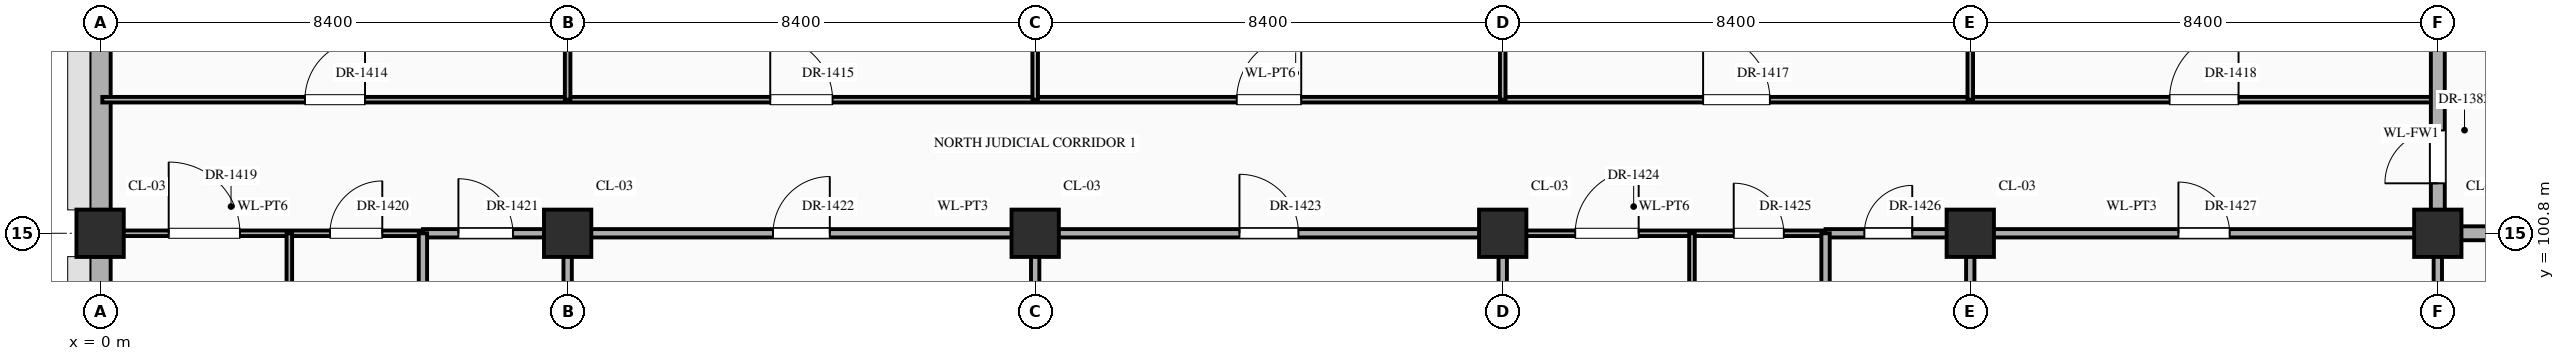
"""IFC4 building model, lengths in metres.
Left out: names, types, materials, properties, quantities, classifications, styles, units other than length and angle.
Written with IfcOpenShell. Run it as: python <this file> out.ifc"""

import sys

from ifc_helpers import new_model, si_unit, direction, frame, frame_2d, origin, origin_2d, place, context, subcontext, project, spatial, rectangle, extrude, element, fill, save


model = new_model("IFC4")
c1 = context("Model", 3, precision=1e-05, world=origin(), true_north=direction((0.0, 1.0)))
c2 = subcontext(c1, "Body", "Model", "MODEL_VIEW")
j1 = project(units=[si_unit("LENGTHUNIT", "METRE"), si_unit("PLANEANGLEUNIT", "RADIAN")], contexts=[c1])
p1 = place(None, origin())
s1 = spatial("IfcSite", under=j1, at=p1, CompositionType="ELEMENT")
p2 = place(p1, origin())
s2 = spatial("IfcBuilding", under=s1, at=p2, CompositionType="ELEMENT")
p3 = place(p2, frame((0.0, 0.0, 10.8)))
s3 = spatial("IfcBuildingStorey", under=s2, at=p3, CompositionType="ELEMENT", Elevation=10.8)
for number, where, z_axis, x_axis in (
    (1, (0.0, 100.8, 0.0), (0.0, 0.0, 1.0), (1.0, 0.0, 0.0)),
    (2, (8.4, 100.8, 0.0), (0.0, 0.0, 1.0), (1.0, 0.0, 0.0)),
    (3, (16.8, 100.8, 0.0), (0.0, 0.0, 1.0), (1.0, 0.0, 0.0)),
    (4, (25.2, 100.8, 0.0), (0.0, 0.0, 1.0), (1.0, 0.0, 0.0)),
    (5, (33.6, 100.8, 0.0), (0.0, 0.0, 1.0), (1.0, 0.0, 0.0)),
    (6, (42.0, 100.8, 0.0), (0.0, 0.0, 1.0), (1.0, 0.0, 0.0)),
):
    element("IfcColumn", number, at=place(p3, frame(where, z_axis=z_axis, x_axis=x_axis)), inside=s3, PredefinedType="COLUMN", context=c2, shape_type="SweptSolid", body=[
        extrude(rectangle(XDim=0.85, YDim=0.85, at=origin_2d()), origin(), (0.0, 0.0, 1.0), 5.4),
    ])
p4 = place(p3, frame((0.0, 94.02, 0.0), z_axis=(0.0, 0.0, 1.0), x_axis=(0.0, 1.0, 0.0)))
e7 = element("IfcWall", 7, at=p4, inside=s3, PredefinedType="STANDARD", context=c2, shape_type="SweptSolid", body=[
    extrude(rectangle(XDim=6.36, YDim=0.38, at=frame_2d((3.18, 0.0))), origin(), (0.0, 0.0, 1.0), 4.47),
])
p5 = place(p4, frame((4.03, 0.0, 0.85)))
e8 = element("IfcOpeningElement", 8, at=p5, cuts=e7, PredefinedType="OPENING", context=c2, shape_type="SweptSolid", body=[
    extrude(rectangle(XDim=0.9, YDim=1.56, at=frame_2d((0.45, 0.78))), frame((0.0, 0.202, 0.0), z_axis=(0.0, -1.0, 0.0), x_axis=(1.0, 0.0, 0.0)), (0.0, 0.0, 1.0), 0.404),
])
p6 = place(p3, frame((0.0, 101.22, 0.0), z_axis=(0.0, 0.0, 1.0), x_axis=(0.0, 1.0, 0.0)))
e9 = element("IfcWall", 9, at=p6, inside=s3, PredefinedType="STANDARD", context=c2, shape_type="SweptSolid", body=[
    extrude(rectangle(XDim=6.36, YDim=0.38, at=frame_2d((3.18, 0.0))), origin(), (0.0, 0.0, 1.0), 4.47),
])
p7 = place(p6, frame((4.03, 0.0, 0.85)))
e10 = element("IfcOpeningElement", 10, at=p7, cuts=e9, PredefinedType="OPENING", context=c2, shape_type="SweptSolid", body=[
    extrude(rectangle(XDim=0.9, YDim=1.74, at=frame_2d((0.45, 0.87))), frame((0.0, 0.202, 0.0), z_axis=(0.0, -1.0, 0.0), x_axis=(1.0, 0.0, 0.0)), (0.0, 0.0, 1.0), 0.404),
])
p8 = place(p3, frame((0.04, 100.8, 0.0), z_axis=(0.0, 0.0, 1.0), x_axis=(1.0, 0.0, 0.0)))
e11 = element("IfcWall", 11, at=p8, inside=s3, PredefinedType="STANDARD", context=c2, shape_type="SweptSolid", body=[
    extrude(rectangle(XDim=5.76, YDim=0.1, at=frame_2d((2.88, 0.0))), origin(), (0.0, 0.0, 1.0), 4.27),
])
p9 = place(p8, frame((1.192, 0.0, 0.0)))
e12 = element("IfcOpeningElement", 12, at=p9, cuts=e11, PredefinedType="OPENING", context=c2, shape_type="SweptSolid", body=[
    extrude(rectangle(XDim=1.28, YDim=2.35, at=frame_2d((0.64, 1.175))), frame((0.0, 0.062, 0.0), z_axis=(0.0, -1.0, 0.0), x_axis=(1.0, 0.0, 0.0)), (0.0, 0.0, 1.0), 0.124),
])
p10 = place(p8, frame((4.09, 0.0, 0.0)))
e13 = element("IfcOpeningElement", 13, at=p10, cuts=e11, PredefinedType="OPENING", context=c2, shape_type="SweptSolid", body=[
    extrude(rectangle(XDim=0.94, YDim=2.3, at=frame_2d((0.47, 1.15))), frame((0.0, 0.062, 0.0), z_axis=(0.0, -1.0, 0.0), x_axis=(1.0, 0.0, 0.0)), (0.0, 0.0, 1.0), 0.124),
])
p11 = place(p3, frame((5.8, 100.8, 0.0), z_axis=(0.0, 0.0, 1.0), x_axis=(1.0, 0.0, 0.0)))
e14 = element("IfcWall", 14, at=p11, inside=s3, PredefinedType="STANDARD", context=c2, shape_type="SweptSolid", body=[
    extrude(rectangle(XDim=19.4, YDim=0.15, at=frame_2d((9.7, 0.0))), origin(), (0.0, 0.0, 1.0), 4.27),
])
p12 = place(p11, frame((0.637, 0.0, 0.0)))
e15 = element("IfcOpeningElement", 15, at=p12, cuts=e14, PredefinedType="OPENING", context=c2, shape_type="SweptSolid", body=[
    extrude(rectangle(XDim=0.98, YDim=2.35, at=frame_2d((0.49, 1.175))), frame((0.0, 0.087, 0.0), z_axis=(0.0, -1.0, 0.0), x_axis=(1.0, 0.0, 0.0)), (0.0, 0.0, 1.0), 0.174),
])
p13 = place(p11, frame((6.29, 0.0, 0.0)))
e16 = element("IfcOpeningElement", 16, at=p13, cuts=e14, PredefinedType="OPENING", context=c2, shape_type="SweptSolid", body=[
    extrude(rectangle(XDim=1.02, YDim=2.4, at=frame_2d((0.51, 1.2))), frame((0.0, 0.087, 0.0), z_axis=(0.0, -1.0, 0.0), x_axis=(1.0, 0.0, 0.0)), (0.0, 0.0, 1.0), 0.174),
])
p14 = place(p11, frame((14.67, 0.0, 0.0)))
e17 = element("IfcOpeningElement", 17, at=p14, cuts=e14, PredefinedType="OPENING", context=c2, shape_type="SweptSolid", body=[
    extrude(rectangle(XDim=1.06, YDim=2.4, at=frame_2d((0.53, 1.2))), frame((0.0, 0.087, 0.0), z_axis=(0.0, -1.0, 0.0), x_axis=(1.0, 0.0, 0.0)), (0.0, 0.0, 1.0), 0.174),
])
p15 = place(p3, frame((25.2, 100.8, 0.0), z_axis=(0.0, 0.0, 1.0), x_axis=(1.0, 0.0, 0.0)))
e18 = element("IfcWall", 18, at=p15, inside=s3, PredefinedType="STANDARD", context=c2, shape_type="SweptSolid", body=[
    extrude(rectangle(XDim=5.8, YDim=0.1, at=frame_2d((2.9, 0.0))), origin(), (0.0, 0.0, 1.0), 4.27),
])
p16 = place(p15, frame((1.302, 0.0, 0.0)))
e19 = element("IfcOpeningElement", 19, at=p16, cuts=e18, PredefinedType="OPENING", context=c2, shape_type="SweptSolid", body=[
    extrude(rectangle(XDim=1.14, YDim=2.4, at=frame_2d((0.57, 1.2))), frame((0.0, 0.062, 0.0), z_axis=(0.0, -1.0, 0.0), x_axis=(1.0, 0.0, 0.0)), (0.0, 0.0, 1.0), 0.124),
])
p17 = place(p15, frame((4.15, 0.0, 0.0)))
e20 = element("IfcOpeningElement", 20, at=p17, cuts=e18, PredefinedType="OPENING", context=c2, shape_type="SweptSolid", body=[
    extrude(rectangle(XDim=0.9, YDim=2.15, at=frame_2d((0.45, 1.075))), frame((0.0, 0.062, 0.0), z_axis=(0.0, -1.0, 0.0), x_axis=(1.0, 0.0, 0.0)), (0.0, 0.0, 1.0), 0.124),
])
p18 = place(p3, frame((31.0, 100.8, 0.0), z_axis=(0.0, 0.0, 1.0), x_axis=(1.0, 0.0, 0.0)))
e21 = element("IfcWall", 21, at=p18, inside=s3, PredefinedType="STANDARD", context=c2, shape_type="SweptSolid", body=[
    extrude(rectangle(XDim=11.0, YDim=0.15, at=frame_2d((5.5, 0.0))), origin(), (0.0, 0.0, 1.0), 4.27),
])
p19 = place(p18, frame((0.698, 0.0, 0.0)))
e22 = element("IfcOpeningElement", 22, at=p19, cuts=e21, PredefinedType="OPENING", context=c2, shape_type="SweptSolid", body=[
    extrude(rectangle(XDim=0.86, YDim=2.1, at=frame_2d((0.43, 1.05))), frame((0.0, 0.087, 0.0), z_axis=(0.0, -1.0, 0.0), x_axis=(1.0, 0.0, 0.0)), (0.0, 0.0, 1.0), 0.174),
])
p20 = place(p18, frame((6.34, 0.0, 0.0)))
e23 = element("IfcOpeningElement", 23, at=p20, cuts=e21, PredefinedType="OPENING", context=c2, shape_type="SweptSolid", body=[
    extrude(rectangle(XDim=0.92, YDim=2.15, at=frame_2d((0.46, 1.075))), frame((0.0, 0.087, 0.0), z_axis=(0.0, -1.0, 0.0), x_axis=(1.0, 0.0, 0.0)), (0.0, 0.0, 1.0), 0.174),
])
p21 = place(p3, frame((42.0, 100.8, 0.0), z_axis=(0.0, 0.0, 1.0), x_axis=(1.0, 0.0, 0.0)))
e24 = element("IfcWall", 24, at=p21, inside=s3, PredefinedType="STANDARD", context=c2, shape_type="SweptSolid", body=[
    extrude(rectangle(XDim=4.2, YDim=0.25, at=frame_2d((2.1, 0.0))), origin(), (0.0, 0.0, 1.0), 4.27),
])
p22 = place(p3, frame((0.04, 103.2, 0.0), z_axis=(0.0, 0.0, 1.0), x_axis=(1.0, 0.0, 0.0)))
e25 = element("IfcWall", 25, at=p22, inside=s3, PredefinedType="STANDARD", context=c2, shape_type="SweptSolid", body=[
    extrude(rectangle(XDim=41.96, YDim=0.1, at=frame_2d((20.98, 0.0))), origin(), (0.0, 0.0, 1.0), 5.12),
])
p23 = place(p22, frame((3.64, 0.0, 0.0)))
e26 = element("IfcOpeningElement", 26, at=p23, cuts=e25, PredefinedType="OPENING", context=c2, shape_type="SweptSolid", body=[
    extrude(rectangle(XDim=1.08, YDim=2.25, at=frame_2d((0.54, 1.125))), frame((0.0, 0.062, 0.0), z_axis=(0.0, -1.0, 0.0), x_axis=(1.0, 0.0, 0.0)), (0.0, 0.0, 1.0), 0.124),
])
p24 = place(p22, frame((12.0, 0.0, 0.0)))
e27 = element("IfcOpeningElement", 27, at=p24, cuts=e25, PredefinedType="OPENING", context=c2, shape_type="SweptSolid", body=[
    extrude(rectangle(XDim=1.12, YDim=2.25, at=frame_2d((0.56, 1.125))), frame((0.0, 0.062, 0.0), z_axis=(0.0, -1.0, 0.0), x_axis=(1.0, 0.0, 0.0)), (0.0, 0.0, 1.0), 0.124),
])
p25 = place(p22, frame((20.38, 0.0, 0.0)))
e28 = element("IfcOpeningElement", 28, at=p25, cuts=e25, PredefinedType="OPENING", context=c2, shape_type="SweptSolid", body=[
    extrude(rectangle(XDim=1.16, YDim=2.3, at=frame_2d((0.58, 1.15))), frame((0.0, 0.062, 0.0), z_axis=(0.0, -1.0, 0.0), x_axis=(1.0, 0.0, 0.0)), (0.0, 0.0, 1.0), 0.124),
])
p26 = place(p22, frame((28.76, 0.0, 0.0)))
e29 = element("IfcOpeningElement", 29, at=p26, cuts=e25, PredefinedType="OPENING", context=c2, shape_type="SweptSolid", body=[
    extrude(rectangle(XDim=1.2, YDim=2.35, at=frame_2d((0.6, 1.175))), frame((0.0, 0.062, 0.0), z_axis=(0.0, -1.0, 0.0), x_axis=(1.0, 0.0, 0.0)), (0.0, 0.0, 1.0), 0.124),
])
p27 = place(p22, frame((37.14, 0.0, 0.0)))
e30 = element("IfcOpeningElement", 30, at=p27, cuts=e25, PredefinedType="OPENING", context=c2, shape_type="SweptSolid", body=[
    extrude(rectangle(XDim=1.24, YDim=2.3, at=frame_2d((0.62, 1.15))), frame((0.0, 0.062, 0.0), z_axis=(0.0, -1.0, 0.0), x_axis=(1.0, 0.0, 0.0)), (0.0, 0.0, 1.0), 0.124),
])
p28 = place(p3, frame((3.4, 96.0, 0.0), z_axis=(0.0, 0.0, 1.0), x_axis=(0.0, 1.0, 0.0)))
e31 = element("IfcWall", 31, at=p28, inside=s3, PredefinedType="STANDARD", context=c2, shape_type="SweptSolid", body=[
    extrude(rectangle(XDim=4.8, YDim=0.1, at=frame_2d((2.4, 0.0))), origin(), (0.0, 0.0, 1.0), 5.12),
])
p29 = place(p28, frame((1.83, 0.0, 0.0)))
e32 = element("IfcOpeningElement", 32, at=p29, cuts=e31, PredefinedType="OPENING", context=c2, shape_type="SweptSolid", body=[
    extrude(rectangle(XDim=1.14, YDim=2.4, at=frame_2d((0.57, 1.2))), frame((0.0, 0.062, 0.0), z_axis=(0.0, -1.0, 0.0), x_axis=(1.0, 0.0, 0.0)), (0.0, 0.0, 1.0), 0.124),
])
p30 = place(p3, frame((5.8, 96.0, 0.0), z_axis=(0.0, 0.0, 1.0), x_axis=(0.0, 1.0, 0.0)))
e33 = element("IfcWall", 33, at=p30, inside=s3, PredefinedType="STANDARD", context=c2, shape_type="SweptSolid", body=[
    extrude(rectangle(XDim=4.8, YDim=0.15, at=frame_2d((2.4, 0.0))), origin(), (0.0, 0.0, 1.0), 5.12),
])
p31 = place(p30, frame((1.95, 0.0, 0.0)))
e34 = element("IfcOpeningElement", 34, at=p31, cuts=e33, PredefinedType="OPENING", context=c2, shape_type="SweptSolid", body=[
    extrude(rectangle(XDim=0.9, YDim=2.15, at=frame_2d((0.45, 1.075))), frame((0.0, 0.087, 0.0), z_axis=(0.0, -1.0, 0.0), x_axis=(1.0, 0.0, 0.0)), (0.0, 0.0, 1.0), 0.174),
])
p32 = place(p3, frame((8.4, 96.0, 0.0), z_axis=(0.0, 0.0, 1.0), x_axis=(0.0, 1.0, 0.0)))
e35 = element("IfcWall", 35, at=p32, inside=s3, PredefinedType="STANDARD", context=c2, shape_type="SweptSolid", body=[
    extrude(rectangle(XDim=4.8, YDim=0.15, at=frame_2d((2.4, 0.0))), origin(), (0.0, 0.0, 1.0), 4.37),
])
p33 = place(p3, frame((8.4, 103.2, 0.0), z_axis=(0.0, 0.0, 1.0), x_axis=(0.0, 1.0, 0.0)))
e36 = element("IfcWall", 36, at=p33, inside=s3, PredefinedType="STANDARD", context=c2, shape_type="SweptSolid", body=[
    extrude(rectangle(XDim=4.76, YDim=0.1, at=frame_2d((2.38, 0.0))), origin(), (0.0, 0.0, 1.0), 4.37),
])
p34 = place(p3, frame((16.8, 96.0, 0.0), z_axis=(0.0, 0.0, 1.0), x_axis=(0.0, 1.0, 0.0)))
e37 = element("IfcWall", 37, at=p34, inside=s3, PredefinedType="STANDARD", context=c2, shape_type="SweptSolid", body=[
    extrude(rectangle(XDim=4.8, YDim=0.15, at=frame_2d((2.4, 0.0))), origin(), (0.0, 0.0, 1.0), 4.37),
])
p35 = place(p3, frame((16.8, 103.2, 0.0), z_axis=(0.0, 0.0, 1.0), x_axis=(0.0, 1.0, 0.0)))
e38 = element("IfcWall", 38, at=p35, inside=s3, PredefinedType="STANDARD", context=c2, shape_type="SweptSolid", body=[
    extrude(rectangle(XDim=4.76, YDim=0.1, at=frame_2d((2.38, 0.0))), origin(), (0.0, 0.0, 1.0), 4.37),
])
p36 = place(p3, frame((25.2, 96.0, 0.0), z_axis=(0.0, 0.0, 1.0), x_axis=(0.0, 1.0, 0.0)))
e39 = element("IfcWall", 39, at=p36, inside=s3, PredefinedType="STANDARD", context=c2, shape_type="SweptSolid", body=[
    extrude(rectangle(XDim=4.8, YDim=0.15, at=frame_2d((2.4, 0.0))), origin(), (0.0, 0.0, 1.0), 4.37),
])
p37 = place(p3, frame((25.2, 103.2, 0.0), z_axis=(0.0, 0.0, 1.0), x_axis=(0.0, 1.0, 0.0)))
e40 = element("IfcWall", 40, at=p37, inside=s3, PredefinedType="STANDARD", context=c2, shape_type="SweptSolid", body=[
    extrude(rectangle(XDim=4.76, YDim=0.1, at=frame_2d((2.38, 0.0))), origin(), (0.0, 0.0, 1.0), 4.37),
])
p38 = place(p3, frame((28.6, 96.0, 0.0), z_axis=(0.0, 0.0, 1.0), x_axis=(0.0, 1.0, 0.0)))
e41 = element("IfcWall", 41, at=p38, inside=s3, PredefinedType="STANDARD", context=c2, shape_type="SweptSolid", body=[
    extrude(rectangle(XDim=4.8, YDim=0.1, at=frame_2d((2.4, 0.0))), origin(), (0.0, 0.0, 1.0), 5.12),
])
p39 = place(p38, frame((1.97, 0.0, 0.0)))
e42 = element("IfcOpeningElement", 42, at=p39, cuts=e41, PredefinedType="OPENING", context=c2, shape_type="SweptSolid", body=[
    extrude(rectangle(XDim=0.86, YDim=2.1, at=frame_2d((0.43, 1.05))), frame((0.0, 0.062, 0.0), z_axis=(0.0, -1.0, 0.0), x_axis=(1.0, 0.0, 0.0)), (0.0, 0.0, 1.0), 0.124),
])
p40 = place(p3, frame((31.0, 96.0, 0.0), z_axis=(0.0, 0.0, 1.0), x_axis=(0.0, 1.0, 0.0)))
e43 = element("IfcWall", 43, at=p40, inside=s3, PredefinedType="STANDARD", context=c2, shape_type="SweptSolid", body=[
    extrude(rectangle(XDim=4.8, YDim=0.15, at=frame_2d((2.4, 0.0))), origin(), (0.0, 0.0, 1.0), 5.12),
])
p41 = place(p40, frame((1.94, 0.0, 0.0)))
e44 = element("IfcOpeningElement", 44, at=p41, cuts=e43, PredefinedType="OPENING", context=c2, shape_type="SweptSolid", body=[
    extrude(rectangle(XDim=0.92, YDim=2.15, at=frame_2d((0.46, 1.075))), frame((0.0, 0.087, 0.0), z_axis=(0.0, -1.0, 0.0), x_axis=(1.0, 0.0, 0.0)), (0.0, 0.0, 1.0), 0.174),
])
p42 = place(p3, frame((33.6, 96.0, 0.0), z_axis=(0.0, 0.0, 1.0), x_axis=(0.0, 1.0, 0.0)))
e45 = element("IfcWall", 45, at=p42, inside=s3, PredefinedType="STANDARD", context=c2, shape_type="SweptSolid", body=[
    extrude(rectangle(XDim=4.8, YDim=0.15, at=frame_2d((2.4, 0.0))), origin(), (0.0, 0.0, 1.0), 4.37),
])
p43 = place(p3, frame((33.6, 103.2, 0.0), z_axis=(0.0, 0.0, 1.0), x_axis=(0.0, 1.0, 0.0)))
e46 = element("IfcWall", 46, at=p43, inside=s3, PredefinedType="STANDARD", context=c2, shape_type="SweptSolid", body=[
    extrude(rectangle(XDim=4.76, YDim=0.1, at=frame_2d((2.38, 0.0))), origin(), (0.0, 0.0, 1.0), 4.37),
])
p44 = place(p3, frame((42.0, 96.0, 0.0), z_axis=(0.0, 0.0, 1.0), x_axis=(0.0, 1.0, 0.0)))
e47 = element("IfcWall", 47, at=p44, inside=s3, PredefinedType="STANDARD", context=c2, shape_type="SweptSolid", body=[
    extrude(rectangle(XDim=4.8, YDim=0.15, at=frame_2d((2.4, 0.0))), origin(), (0.0, 0.0, 1.0), 4.37),
])
p45 = place(p3, frame((42.0, 100.8, 0.0), z_axis=(0.0, 0.0, 1.0), x_axis=(0.0, 1.0, 0.0)))
e48 = element("IfcWall", 48, at=p45, inside=s3, PredefinedType="STANDARD", context=c2, shape_type="SweptSolid", body=[
    extrude(rectangle(XDim=3.6, YDim=0.25, at=frame_2d((1.8, 0.0))), origin(), (0.0, 0.0, 1.0), 4.37),
])
p46 = place(p45, frame((0.897, 0.0, 0.0)))
e49 = element("IfcOpeningElement", 49, at=p46, cuts=e48, PredefinedType="OPENING", context=c2, shape_type="SweptSolid", body=[
    extrude(rectangle(XDim=0.95, YDim=2.15, at=frame_2d((0.475, 1.075))), frame((0.0, 0.137, 0.0), z_axis=(0.0, -1.0, 0.0), x_axis=(1.0, 0.0, 0.0)), (0.0, 0.0, 1.0), 0.274),
])
p47 = place(p46, origin())
e50 = element("IfcDoor", 50, at=p47, inside=s3, OperationType="SINGLE_SWING_LEFT", PredefinedType="DOOR", context=c2, shape_type="SweptSolid", body=[
    extrude(rectangle(XDim=0.95, YDim=2.15, at=frame_2d((0.475, 1.075))), frame((0.0, 0.025, 0.0), z_axis=(0.0, -1.0, 0.0), x_axis=(1.0, 0.0, 0.0)), (0.0, 0.0, 1.0), 0.05),
])
fill(e49, e50)
p48 = place(p23, origin())
e51 = element("IfcDoor", 51, at=p48, inside=s3, OperationType="SINGLE_SWING_RIGHT", PredefinedType="DOOR", context=c2, shape_type="SweptSolid", body=[
    extrude(rectangle(XDim=1.08, YDim=2.25, at=frame_2d((0.54, 1.125))), frame((0.0, 0.025, 0.0), z_axis=(0.0, -1.0, 0.0), x_axis=(1.0, 0.0, 0.0)), (0.0, 0.0, 1.0), 0.05),
])
fill(e26, e51)
p49 = place(p24, origin())
e52 = element("IfcDoor", 52, at=p49, inside=s3, OperationType="SINGLE_SWING_LEFT", PredefinedType="DOOR", context=c2, shape_type="SweptSolid", body=[
    extrude(rectangle(XDim=1.12, YDim=2.25, at=frame_2d((0.56, 1.125))), frame((0.0, 0.025, 0.0), z_axis=(0.0, -1.0, 0.0), x_axis=(1.0, 0.0, 0.0)), (0.0, 0.0, 1.0), 0.05),
])
fill(e27, e52)
p50 = place(p25, origin())
e53 = element("IfcDoor", 53, at=p50, inside=s3, OperationType="SINGLE_SWING_RIGHT", PredefinedType="DOOR", context=c2, shape_type="SweptSolid", body=[
    extrude(rectangle(XDim=1.16, YDim=2.3, at=frame_2d((0.58, 1.15))), frame((0.0, 0.025, 0.0), z_axis=(0.0, -1.0, 0.0), x_axis=(1.0, 0.0, 0.0)), (0.0, 0.0, 1.0), 0.05),
])
fill(e28, e53)
p51 = place(p26, origin())
e54 = element("IfcDoor", 54, at=p51, inside=s3, OperationType="SINGLE_SWING_LEFT", PredefinedType="DOOR", context=c2, shape_type="SweptSolid", body=[
    extrude(rectangle(XDim=1.2, YDim=2.35, at=frame_2d((0.6, 1.175))), frame((0.0, 0.025, 0.0), z_axis=(0.0, -1.0, 0.0), x_axis=(1.0, 0.0, 0.0)), (0.0, 0.0, 1.0), 0.05),
])
fill(e29, e54)
p52 = place(p27, origin())
e55 = element("IfcDoor", 55, at=p52, inside=s3, OperationType="SINGLE_SWING_RIGHT", PredefinedType="DOOR", context=c2, shape_type="SweptSolid", body=[
    extrude(rectangle(XDim=1.24, YDim=2.3, at=frame_2d((0.62, 1.15))), frame((0.0, 0.025, 0.0), z_axis=(0.0, -1.0, 0.0), x_axis=(1.0, 0.0, 0.0)), (0.0, 0.0, 1.0), 0.05),
])
fill(e30, e55)
p53 = place(p9, origin())
e56 = element("IfcDoor", 56, at=p53, inside=s3, OperationType="SINGLE_SWING_LEFT", PredefinedType="DOOR", context=c2, shape_type="SweptSolid", body=[
    extrude(rectangle(XDim=1.28, YDim=2.35, at=frame_2d((0.64, 1.175))), frame((0.0, 0.025, 0.0), z_axis=(0.0, -1.0, 0.0), x_axis=(1.0, 0.0, 0.0)), (0.0, 0.0, 1.0), 0.05),
])
fill(e12, e56)
p54 = place(p10, origin())
e57 = element("IfcDoor", 57, at=p54, inside=s3, OperationType="SINGLE_SWING_RIGHT", PredefinedType="DOOR", context=c2, shape_type="SweptSolid", body=[
    extrude(rectangle(XDim=0.94, YDim=2.3, at=frame_2d((0.47, 1.15))), frame((0.0, 0.025, 0.0), z_axis=(0.0, -1.0, 0.0), x_axis=(1.0, 0.0, 0.0)), (0.0, 0.0, 1.0), 0.05),
])
fill(e13, e57)
p55 = place(p12, origin())
e58 = element("IfcDoor", 58, at=p55, inside=s3, OperationType="SINGLE_SWING_LEFT", PredefinedType="DOOR", context=c2, shape_type="SweptSolid", body=[
    extrude(rectangle(XDim=0.98, YDim=2.35, at=frame_2d((0.49, 1.175))), frame((0.0, 0.025, 0.0), z_axis=(0.0, -1.0, 0.0), x_axis=(1.0, 0.0, 0.0)), (0.0, 0.0, 1.0), 0.05),
])
fill(e15, e58)
p56 = place(p13, origin())
e59 = element("IfcDoor", 59, at=p56, inside=s3, OperationType="SINGLE_SWING_RIGHT", PredefinedType="DOOR", context=c2, shape_type="SweptSolid", body=[
    extrude(rectangle(XDim=1.02, YDim=2.4, at=frame_2d((0.51, 1.2))), frame((0.0, 0.025, 0.0), z_axis=(0.0, -1.0, 0.0), x_axis=(1.0, 0.0, 0.0)), (0.0, 0.0, 1.0), 0.05),
])
fill(e16, e59)
p57 = place(p14, origin())
e60 = element("IfcDoor", 60, at=p57, inside=s3, OperationType="SINGLE_SWING_LEFT", PredefinedType="DOOR", context=c2, shape_type="SweptSolid", body=[
    extrude(rectangle(XDim=1.06, YDim=2.4, at=frame_2d((0.53, 1.2))), frame((0.0, 0.025, 0.0), z_axis=(0.0, -1.0, 0.0), x_axis=(1.0, 0.0, 0.0)), (0.0, 0.0, 1.0), 0.05),
])
fill(e17, e60)
p58 = place(p16, origin())
e61 = element("IfcDoor", 61, at=p58, inside=s3, OperationType="SINGLE_SWING_RIGHT", PredefinedType="DOOR", context=c2, shape_type="SweptSolid", body=[
    extrude(rectangle(XDim=1.14, YDim=2.4, at=frame_2d((0.57, 1.2))), frame((0.0, 0.025, 0.0), z_axis=(0.0, -1.0, 0.0), x_axis=(1.0, 0.0, 0.0)), (0.0, 0.0, 1.0), 0.05),
])
fill(e19, e61)
p59 = place(p17, origin())
e62 = element("IfcDoor", 62, at=p59, inside=s3, OperationType="SINGLE_SWING_LEFT", PredefinedType="DOOR", context=c2, shape_type="SweptSolid", body=[
    extrude(rectangle(XDim=0.9, YDim=2.15, at=frame_2d((0.45, 1.075))), frame((0.0, 0.025, 0.0), z_axis=(0.0, -1.0, 0.0), x_axis=(1.0, 0.0, 0.0)), (0.0, 0.0, 1.0), 0.05),
])
fill(e20, e62)
p60 = place(p19, origin())
e63 = element("IfcDoor", 63, at=p60, inside=s3, OperationType="SINGLE_SWING_RIGHT", PredefinedType="DOOR", context=c2, shape_type="SweptSolid", body=[
    extrude(rectangle(XDim=0.86, YDim=2.1, at=frame_2d((0.43, 1.05))), frame((0.0, 0.025, 0.0), z_axis=(0.0, -1.0, 0.0), x_axis=(1.0, 0.0, 0.0)), (0.0, 0.0, 1.0), 0.05),
])
fill(e22, e63)
p61 = place(p20, origin())
e64 = element("IfcDoor", 64, at=p61, inside=s3, OperationType="SINGLE_SWING_LEFT", PredefinedType="DOOR", context=c2, shape_type="SweptSolid", body=[
    extrude(rectangle(XDim=0.92, YDim=2.15, at=frame_2d((0.46, 1.075))), frame((0.0, 0.025, 0.0), z_axis=(0.0, -1.0, 0.0), x_axis=(1.0, 0.0, 0.0)), (0.0, 0.0, 1.0), 0.05),
])
fill(e23, e64)
save(model, sys.argv[1])
